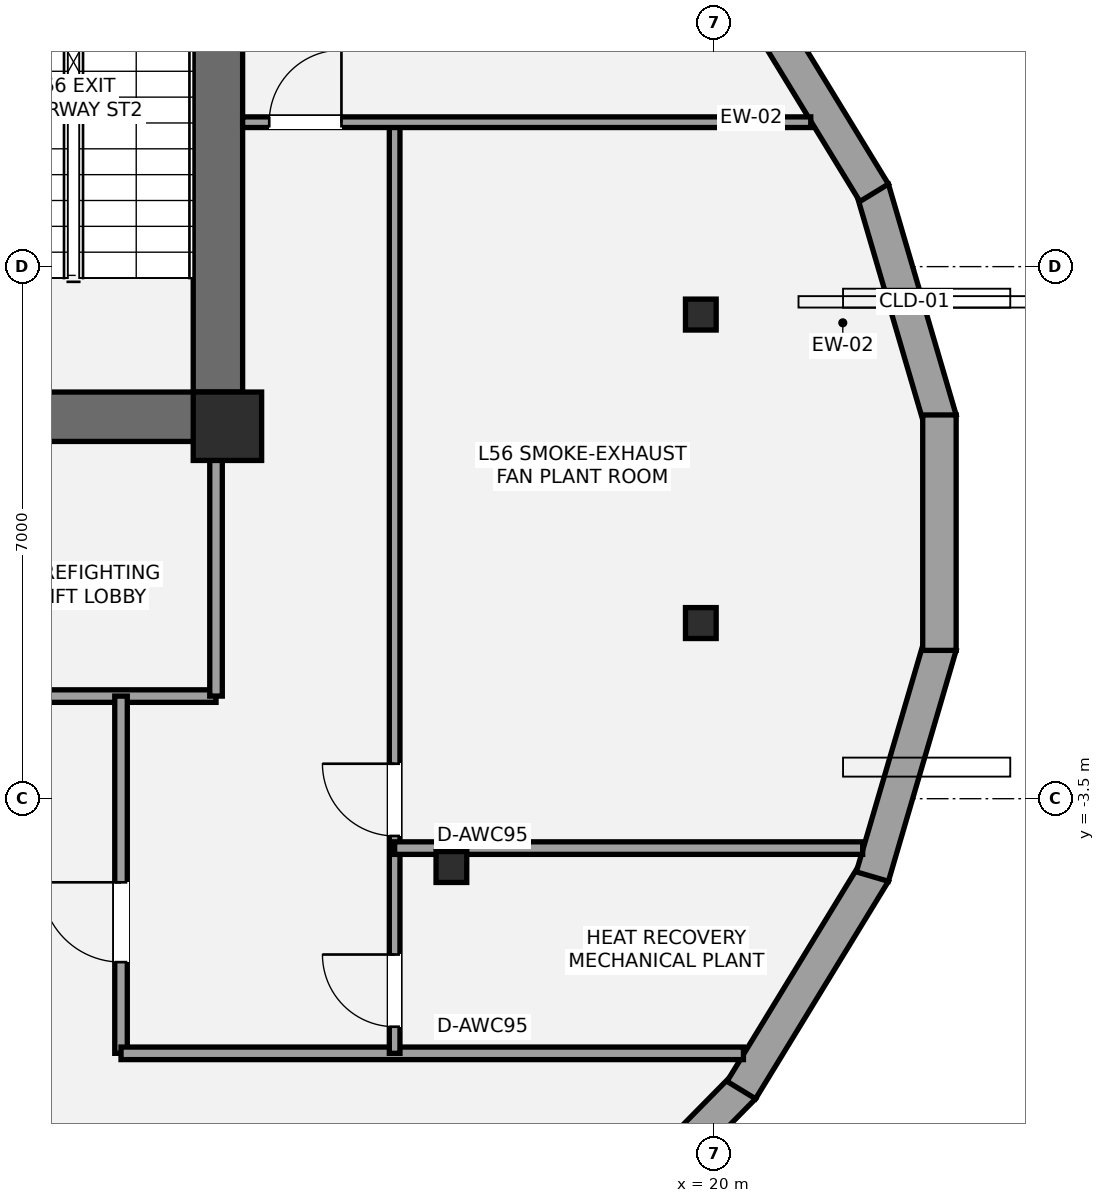
"""IFC4 building model, lengths in metres.
Left out: names, types, materials, properties, quantities, classifications, styles, units other than length and angle.
Written with IfcOpenShell. Run it as: python <this file> out.ifc"""

import sys

from ifc_helpers import new_model, si_unit, direction, frame, frame_2d, origin, origin_2d, place, context, subcontext, project, spatial, rectangle, i_section, extrude, element, fill, save


model = new_model("IFC4")
c1 = context("Model", 3, precision=1e-05, world=origin(), true_north=direction((0.0, 1.0)))
c2 = subcontext(c1, "Body", "Model", "MODEL_VIEW")
j1 = project(units=[si_unit("LENGTHUNIT", "METRE"), si_unit("PLANEANGLEUNIT", "RADIAN")], contexts=[c1])
p1 = place(None, origin())
s1 = spatial("IfcSite", under=j1, at=p1, CompositionType="ELEMENT")
p2 = place(p1, origin())
s2 = spatial("IfcBuilding", under=s1, at=p2, CompositionType="ELEMENT")
p3 = place(p2, frame((0.0, 0.0, 201.4)))
s3 = spatial("IfcBuildingStorey", under=s2, at=p3, CompositionType="ELEMENT", Elevation=201.4)
p4 = place(p3, frame((13.475, 1.2, 0.0), z_axis=(0.0, 0.0, 1.0), x_axis=(0.0, 1.0, 0.0)))
e1 = element("IfcWall", 1, at=p4, inside=s3, PredefinedType="SHEAR", context=c2, shape_type="SweptSolid", body=[
    extrude(rectangle(XDim=8.45, YDim=0.65, at=frame_2d((4.225, 0.0))), origin(), (0.0, 0.0, 1.0), 4.5),
])
p5 = place(p3, frame((13.8, 1.525, 0.0), z_axis=(0.0, 0.0, 1.0), x_axis=(-1.0, 0.0, 0.0)))
e2 = element("IfcWall", 2, at=p5, inside=s3, PredefinedType="SHEAR", context=c2, shape_type="SweptSolid", body=[
    extrude(rectangle(XDim=8.925, YDim=0.65, at=frame_2d((4.462, 0.0))), origin(), (0.0, 0.0, 1.0), 4.5),
])
p6 = place(p5, frame((2.57, 0.0, 0.0)))
e3 = element("IfcOpeningElement", 3, at=p6, cuts=e2, PredefinedType="OPENING", context=c2, shape_type="SweptSolid", body=[
    extrude(rectangle(XDim=1.05, YDim=2.15, at=frame_2d((0.525, 1.075))), frame((0.0, 0.335, 0.0), z_axis=(0.0, -1.0, 0.0), x_axis=(1.0, 0.0, 0.0)), (0.0, 0.0, 1.0), 0.67),
])
p7 = place(p5, frame((4.45, 0.0, 0.0)))
e4 = element("IfcOpeningElement", 4, at=p7, cuts=e2, PredefinedType="OPENING", context=c2, shape_type="SweptSolid", body=[
    extrude(rectangle(XDim=1.1, YDim=2.2, at=frame_2d((0.55, 1.1))), frame((0.0, 0.335, 0.0), z_axis=(0.0, -1.0, 0.0), x_axis=(1.0, 0.0, 0.0)), (0.0, 0.0, 1.0), 0.67),
])
p8 = place(p3, frame((13.6, 1.4, 0.0), z_axis=(0.0, 0.0, 1.0), x_axis=(1.0, 0.0, 0.0)))
e5 = element("IfcColumn", 5, at=p8, inside=s3, PredefinedType="COLUMN", context=c2, shape_type="SweptSolid", body=[
    extrude(rectangle(XDim=0.9, YDim=0.9, at=origin_2d()), origin(), (0.0, 0.0, 1.0), 4.5),
])
for number, where, z_axis, x_axis in (
    (6, (19.828, 2.869, 0.0), (0.0, 0.0, 1.0), (1.0, 0.0, 0.0)),
    (7, (16.547, -4.398, 0.0), (0.0, 0.0, 1.0), (1.0, 0.0, 0.0)),
    (8, (19.828, -1.189, 0.0), (0.0, 0.0, 1.0), (1.0, 0.0, 0.0)),
):
    element("IfcColumn", number, at=place(p3, frame(where, z_axis=z_axis, x_axis=x_axis)), inside=s3, PredefinedType="COLUMN", context=c2, shape_type="SweptSolid", body=[
        extrude(i_section(OverallWidth=0.404, OverallDepth=0.407, WebThickness=0.027, FlangeThickness=0.044, at=origin_2d()), origin(), (0.0, 0.0, 1.0), 4.5),
    ])
p9 = place(p3, frame((22.086, 4.525, 0.0), z_axis=(0.0, 0.0, 1.0), x_axis=(0.281477355005, -0.959567870773, 0.0)))
e9 = element("IfcWall", 9, at=p9, inside=s3, PredefinedType="STANDARD", context=c2, shape_type="SweptSolid", body=[
    extrude(rectangle(XDim=3.166, YDim=0.44, at=frame_2d((1.583, 0.0))), origin(), (0.0, 0.0, 1.0), 3.575),
])
p10 = place(p3, frame((20.361, 7.333, 0.0), z_axis=(0.0, 0.0, 1.0), x_axis=(0.521214394333, -0.853425775999, 0.0)))
e10 = element("IfcWall", 10, at=p10, inside=s3, PredefinedType="STANDARD", context=c2, shape_type="SweptSolid", body=[
    extrude(rectangle(XDim=3.353, YDim=0.44, at=frame_2d((1.677, 0.0))), origin(), (0.0, 0.0, 1.0), 3.575),
])
p11 = place(p3, frame((20.392, -7.294, 0.0), z_axis=(0.0, 0.0, 1.0), x_axis=(-0.701887992659, -0.712287333708, 0.0)))
e11 = element("IfcWall", 11, at=p11, inside=s3, PredefinedType="STANDARD", context=c2, shape_type="SweptSolid", body=[
    extrude(rectangle(XDim=3.615, YDim=0.44, at=frame_2d((1.808, 0.0))), origin(), (0.0, 0.0, 1.0), 3.575),
])
p12 = place(p3, frame((22.109, -4.472, 0.0), z_axis=(0.0, 0.0, 1.0), x_axis=(-0.521214394333, -0.853425775999, 0.0)))
e12 = element("IfcWall", 12, at=p12, inside=s3, PredefinedType="STANDARD", context=c2, shape_type="SweptSolid", body=[
    extrude(rectangle(XDim=3.353, YDim=0.44, at=frame_2d((1.677, 0.0))), origin(), (0.0, 0.0, 1.0), 3.575),
])
p13 = place(p3, frame((22.977, -1.487, 0.0), z_axis=(0.0, 0.0, 1.0), x_axis=(-0.281477355005, -0.959567870773, 0.0)))
e13 = element("IfcWall", 13, at=p13, inside=s3, PredefinedType="STANDARD", context=c2, shape_type="SweptSolid", body=[
    extrude(rectangle(XDim=3.166, YDim=0.44, at=frame_2d((1.583, 0.0))), origin(), (0.0, 0.0, 1.0), 3.575),
])
p14 = place(p3, frame((22.968, 1.549, 0.0), z_axis=(0.0, 0.0, 1.0), x_axis=(0.0, -1.0, 0.0)))
e14 = element("IfcWall", 14, at=p14, inside=s3, PredefinedType="STANDARD", context=c2, shape_type="SweptSolid", body=[
    extrude(rectangle(XDim=3.097, YDim=0.44, at=frame_2d((1.549, 0.0))), origin(), (0.0, 0.0, 1.0), 3.575),
])
p15 = place(p3, frame((7.2, -2.15, 0.0), z_axis=(0.0, 0.0, 1.0), x_axis=(1.0, 0.0, 0.0)))
e15 = element("IfcWall", 15, at=p15, inside=s3, PredefinedType="PARTITIONING", context=c2, shape_type="SweptSolid", body=[
    extrude(rectangle(XDim=6.25, YDim=0.165, at=frame_2d((3.125, 0.0))), origin(), (0.0, 0.0, 1.0), 4.28),
])
p16 = place(p15, frame((1.4, 0.0, 0.0)))
e16 = element("IfcOpeningElement", 16, at=p16, cuts=e15, PredefinedType="OPENING", context=c2, shape_type="SweptSolid", body=[
    extrude(rectangle(XDim=1.05, YDim=2.15, at=frame_2d((0.525, 1.075))), frame((0.0, 0.093, 0.0), z_axis=(0.0, -1.0, 0.0), x_axis=(1.0, 0.0, 0.0)), (0.0, 0.0, 1.0), 0.185),
])
p17 = place(p3, frame((13.45, -2.15, 0.0), z_axis=(0.0, 0.0, 1.0), x_axis=(0.0, 1.0, 0.0)))
e17 = element("IfcWall", 17, at=p17, inside=s3, PredefinedType="PARTITIONING", context=c2, shape_type="SweptSolid", body=[
    extrude(rectangle(XDim=3.4, YDim=0.165, at=frame_2d((1.7, 0.0))), origin(), (0.0, 0.0, 1.0), 2.47),
])
p18 = place(p3, frame((12.2, -6.85, 0.0), z_axis=(0.0, 0.0, 1.0), x_axis=(0.0, 1.0, 0.0)))
e18 = element("IfcWall", 18, at=p18, inside=s3, PredefinedType="PARTITIONING", context=c2, shape_type="SweptSolid", body=[
    extrude(rectangle(XDim=4.7, YDim=0.165, at=frame_2d((2.35, 0.0))), origin(), (0.0, 0.0, 1.0), 3.733),
])
p19 = place(p18, frame((1.2, 0.0, 0.0)))
e19 = element("IfcOpeningElement", 19, at=p19, cuts=e18, PredefinedType="OPENING", context=c2, shape_type="SweptSolid", body=[
    extrude(rectangle(XDim=1.05, YDim=2.15, at=frame_2d((0.525, 1.075))), frame((0.0, 0.093, 0.0), z_axis=(0.0, -1.0, 0.0), x_axis=(1.0, 0.0, 0.0)), (0.0, 0.0, 1.0), 0.185),
])
p20 = place(p3, frame((12.2, -6.85, 0.0), z_axis=(0.0, 0.0, 1.0), x_axis=(1.0, 0.0, 0.0)))
e20 = element("IfcWall", 20, at=p20, inside=s3, PredefinedType="PARTITIONING", context=c2, shape_type="SweptSolid", body=[
    extrude(rectangle(XDim=8.189, YDim=0.165, at=frame_2d((4.095, 0.0))), origin(), (0.0, 0.0, 1.0), 3.733),
])
p21 = place(p3, frame((15.8, -6.85, 0.0), z_axis=(0.0, 0.0, 1.0), x_axis=(0.0, 1.0, 0.0)))
e21 = element("IfcWall", 21, at=p21, inside=s3, PredefinedType="PARTITIONING", context=c2, shape_type="SweptSolid", body=[
    extrude(rectangle(XDim=12.25, YDim=0.14, at=frame_2d((6.125, 0.0))), origin(), (0.0, 0.0, 1.0), 2.47),
])
p22 = place(p21, frame((0.35, 0.0, 0.0)))
e22 = element("IfcOpeningElement", 22, at=p22, cuts=e21, PredefinedType="OPENING", context=c2, shape_type="SweptSolid", body=[
    extrude(rectangle(XDim=0.95, YDim=2.15, at=frame_2d((0.475, 1.075))), frame((0.0, 0.08, 0.0), z_axis=(0.0, -1.0, 0.0), x_axis=(1.0, 0.0, 0.0)), (0.0, 0.0, 1.0), 0.16),
])
p23 = place(p21, frame((2.86, 0.0, 0.0)))
e23 = element("IfcOpeningElement", 23, at=p23, cuts=e21, PredefinedType="OPENING", context=c2, shape_type="SweptSolid", body=[
    extrude(rectangle(XDim=0.95, YDim=2.15, at=frame_2d((0.475, 1.075))), frame((0.0, 0.08, 0.0), z_axis=(0.0, -1.0, 0.0), x_axis=(1.0, 0.0, 0.0)), (0.0, 0.0, 1.0), 0.16),
])
p24 = place(p3, frame((13.8, 5.4, 0.0), z_axis=(0.0, 0.0, 1.0), x_axis=(1.0, 0.0, 0.0)))
e24 = element("IfcWall", 24, at=p24, inside=s3, PredefinedType="PARTITIONING", context=c2, shape_type="SweptSolid", body=[
    extrude(rectangle(XDim=7.475, YDim=0.14, at=frame_2d((3.737, 0.0))), origin(), (0.0, 0.0, 1.0), 4.28),
])
p25 = place(p24, frame((0.35, 0.0, 0.0)))
e25 = element("IfcOpeningElement", 25, at=p25, cuts=e24, PredefinedType="OPENING", context=c2, shape_type="SweptSolid", body=[
    extrude(rectangle(XDim=0.95, YDim=2.15, at=frame_2d((0.475, 1.075))), frame((0.0, 0.08, 0.0), z_axis=(0.0, -1.0, 0.0), x_axis=(1.0, 0.0, 0.0)), (0.0, 0.0, 1.0), 0.16),
])
p26 = place(p3, frame((15.8, -4.15, 0.0), z_axis=(0.0, 0.0, 1.0), x_axis=(1.0, 0.0, 0.0)))
e26 = element("IfcWall", 26, at=p26, inside=s3, PredefinedType="PARTITIONING", context=c2, shape_type="SweptSolid", body=[
    extrude(rectangle(XDim=6.158, YDim=0.165, at=frame_2d((3.079, 0.0))), origin(), (0.0, 0.0, 1.0), 2.47),
])
p27 = place(p19, origin())
e27 = element("IfcDoor", 27, at=p27, inside=s3, OperationType="SINGLE_SWING_RIGHT", PredefinedType="DOOR", context=c2, shape_type="SweptSolid", body=[
    extrude(rectangle(XDim=1.05, YDim=2.15, at=frame_2d((0.525, 1.075))), frame((0.0, 0.025, 0.0), z_axis=(0.0, -1.0, 0.0), x_axis=(1.0, 0.0, 0.0)), (0.0, 0.0, 1.0), 0.05),
])
fill(e19, e27)
p28 = place(p22, origin())
e28 = element("IfcDoor", 28, at=p28, inside=s3, OperationType="SINGLE_SWING_RIGHT", PredefinedType="DOOR", context=c2, shape_type="SweptSolid", body=[
    extrude(rectangle(XDim=0.95, YDim=2.15, at=frame_2d((0.475, 1.075))), frame((0.0, 0.025, 0.0), z_axis=(0.0, -1.0, 0.0), x_axis=(1.0, 0.0, 0.0)), (0.0, 0.0, 1.0), 0.05),
])
fill(e22, e28)
p29 = place(p23, origin())
e29 = element("IfcDoor", 29, at=p29, inside=s3, OperationType="SINGLE_SWING_RIGHT", PredefinedType="DOOR", context=c2, shape_type="SweptSolid", body=[
    extrude(rectangle(XDim=0.95, YDim=2.15, at=frame_2d((0.475, 1.075))), frame((0.0, 0.025, 0.0), z_axis=(0.0, -1.0, 0.0), x_axis=(1.0, 0.0, 0.0)), (0.0, 0.0, 1.0), 0.05),
])
fill(e23, e29)
p30 = place(p25, origin())
e30 = element("IfcDoor", 30, at=p30, inside=s3, OperationType="SINGLE_SWING_RIGHT", PredefinedType="DOOR", context=c2, shape_type="SweptSolid", body=[
    extrude(rectangle(XDim=0.95, YDim=2.15, at=frame_2d((0.475, 1.075))), frame((0.0, 0.025, 0.0), z_axis=(0.0, -1.0, 0.0), x_axis=(1.0, 0.0, 0.0)), (0.0, 0.0, 1.0), 0.05),
])
fill(e25, e30)
save(model, sys.argv[1])
